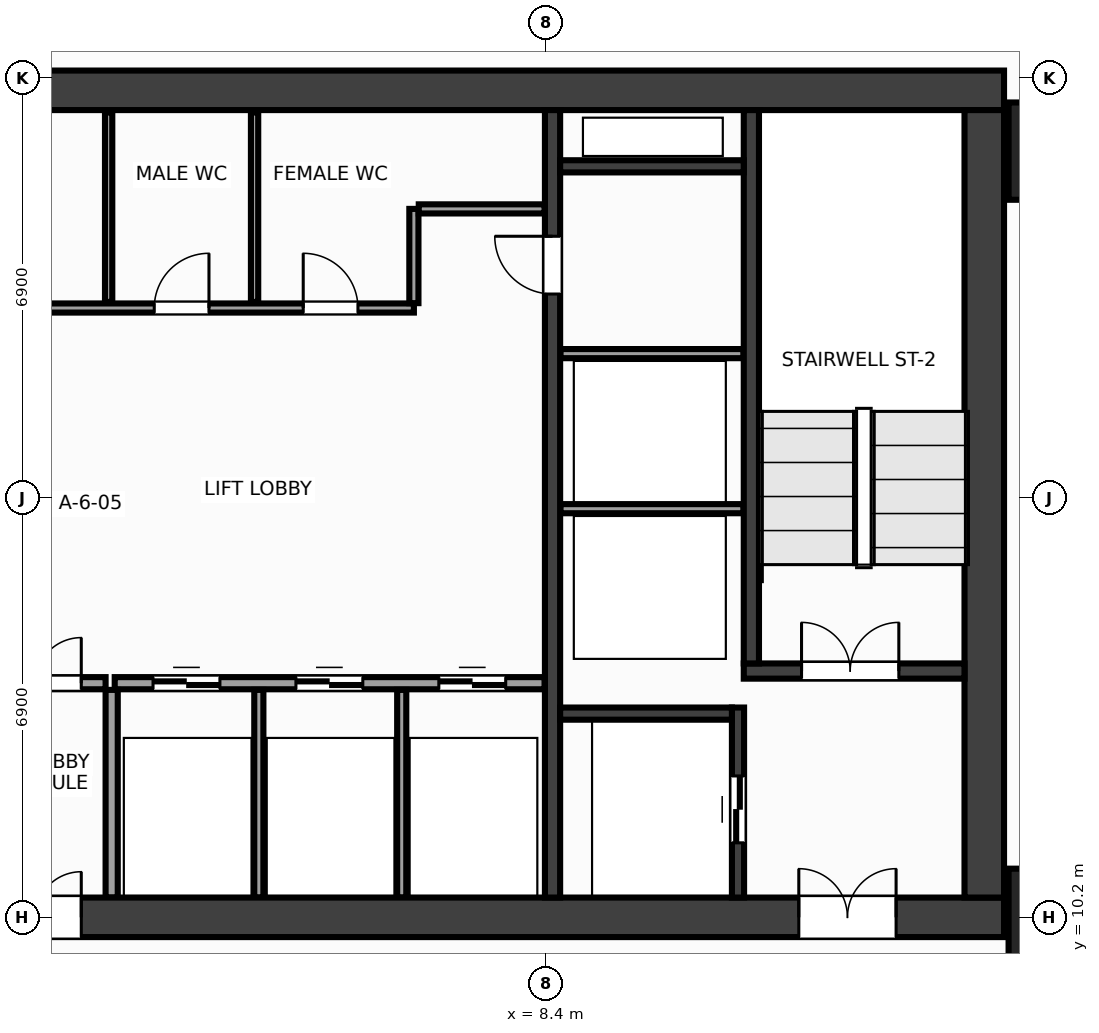
"""IFC4 building model, lengths in metres.
Left out: names, types, materials, properties, quantities, classifications, styles, units other than length and angle.
Written with IfcOpenShell. Run it as: python <this file> out.ifc"""

import sys

from ifc_helpers import new_model, si_unit, direction, frame, frame_2d, origin, origin_2d, place, context, subcontext, project, spatial, rectangle, extrude, source, transform, mapped, element, fill, save


model = new_model("IFC4")
c1 = context("Model", 3, precision=1e-05, world=origin(), true_north=direction((0.0, 1.0)))
c2 = subcontext(c1, "Body", "Model", "MODEL_VIEW")
j1 = project(units=[si_unit("LENGTHUNIT", "METRE"), si_unit("PLANEANGLEUNIT", "RADIAN")], contexts=[c1])
p1 = place(None, origin())
s1 = spatial("IfcSite", under=j1, at=p1, CompositionType="ELEMENT")
p2 = place(p1, origin())
s2 = spatial("IfcBuilding", under=s1, at=p2, CompositionType="ELEMENT")
p3 = place(p2, frame((0.0, 0.0, 167.6)))
s3 = spatial("IfcBuildingStorey", under=s2, at=p3, CompositionType="ELEMENT", Elevation=167.6)
m1 = source(origin(), c2, "Body", "SweptSolid", [
    extrude(rectangle(XDim=31.85, YDim=0.65, at=frame_2d((15.925, 0.0))), origin(), (0.0, 0.0, 1.0), 3.6),
])
p4 = place(p3, frame((-15.925, 23.8, 0.0), z_axis=(0.0, 0.0, 1.0), x_axis=(1.0, 0.0, 0.0)))
e1 = element("IfcWall", 1, at=p4, inside=s3, PredefinedType="SHEAR", context=c2, shape_type="MappedRepresentation", body=[
    mapped(m1, transform((0.0, 0.0, 0.0), x_axis=(1.0, 0.0, 0.0), y_axis=(0.0, 1.0, 0.0), z_axis=(0.0, 0.0, 1.0), scale=1.0)),
])
p5 = place(p3, frame((-15.925, 10.2, 0.0), z_axis=(0.0, 0.0, 1.0), x_axis=(1.0, 0.0, 0.0)))
e2 = element("IfcWall", 2, at=p5, inside=s3, PredefinedType="SHEAR", context=c2, shape_type="MappedRepresentation", body=[
    mapped(m1, transform((0.0, 0.0, 0.0), x_axis=(1.0, 0.0, 0.0), y_axis=(0.0, 1.0, 0.0), z_axis=(0.0, 0.0, 1.0), scale=1.0)),
])
p6 = place(p5, frame((1.775, 0.0, 0.0)))
e3 = element("IfcOpeningElement", 3, at=p6, cuts=e2, PredefinedType="OPENING", context=c2, shape_type="SweptSolid", body=[
    extrude(rectangle(XDim=1.6, YDim=2.15, at=frame_2d((0.8, 1.075))), frame((0.0, 0.337, 0.0), z_axis=(0.0, -1.0, 0.0), x_axis=(1.0, 0.0, 0.0)), (0.0, 0.0, 1.0), 0.674),
])
p7 = place(p5, frame((28.475, 0.0, 0.0)))
e4 = element("IfcOpeningElement", 4, at=p7, cuts=e2, PredefinedType="OPENING", context=c2, shape_type="SweptSolid", body=[
    extrude(rectangle(XDim=1.6, YDim=2.15, at=frame_2d((0.8, 1.075))), frame((0.0, 0.337, 0.0), z_axis=(0.0, -1.0, 0.0), x_axis=(1.0, 0.0, 0.0)), (0.0, 0.0, 1.0), 0.674),
])
p8 = place(p5, frame((15.175, 0.0, 0.0)))
e5 = element("IfcOpeningElement", 5, at=p8, cuts=e2, PredefinedType="OPENING", context=c2, shape_type="SweptSolid", body=[
    extrude(rectangle(XDim=1.5, YDim=2.2, at=frame_2d((0.75, 1.1))), frame((0.0, 0.337, 0.0), z_axis=(0.0, -1.0, 0.0), x_axis=(1.0, 0.0, 0.0)), (0.0, 0.0, 1.0), 0.674),
])
m2 = source(origin(), c2, "Body", "SweptSolid", [
    extrude(rectangle(XDim=12.95, YDim=0.65, at=frame_2d((6.475, 0.0))), origin(), (0.0, 0.0, 1.0), 3.6),
])
p9 = place(p3, frame((15.6, 10.525, 0.0), z_axis=(0.0, 0.0, 1.0), x_axis=(0.0, 1.0, 0.0)))
e6 = element("IfcWall", 6, at=p9, inside=s3, PredefinedType="SHEAR", context=c2, shape_type="MappedRepresentation", body=[
    mapped(m2, transform((0.0, 0.0, 0.0), x_axis=(1.0, 0.0, 0.0), y_axis=(0.0, 1.0, 0.0), z_axis=(0.0, 0.0, 1.0), scale=1.0)),
])
m3 = source(origin(), c2, "Body", "SweptSolid", [
    extrude(rectangle(XDim=12.95, YDim=0.25, at=frame_2d((6.475, 0.0))), origin(), (0.0, 0.0, 1.0), 3.6),
])
p10 = place(p3, frame((8.5, 10.525, 0.0), z_axis=(0.0, 0.0, 1.0), x_axis=(0.0, 1.0, 0.0)))
e7 = element("IfcWall", 7, at=p10, inside=s3, PredefinedType="SHEAR", context=c2, shape_type="MappedRepresentation", body=[
    mapped(m3, transform((0.0, 0.0, 0.0), x_axis=(1.0, 0.0, 0.0), y_axis=(0.0, 1.0, 0.0), z_axis=(0.0, 0.0, 1.0), scale=1.0)),
])
p11 = place(p10, frame((9.925, 0.0, 0.0)))
e8 = element("IfcOpeningElement", 8, at=p11, cuts=e7, PredefinedType="OPENING", context=c2, shape_type="SweptSolid", body=[
    extrude(rectangle(XDim=0.95, YDim=2.15, at=frame_2d((0.475, 1.075))), frame((0.0, 0.137, 0.0), z_axis=(0.0, -1.0, 0.0), x_axis=(1.0, 0.0, 0.0)), (0.0, 0.0, 1.0), 0.274),
])
m4 = source(origin(), c2, "Body", "SweptSolid", [
    extrude(rectangle(XDim=3.63, YDim=0.25, at=frame_2d((1.815, 0.0))), origin(), (0.0, 0.0, 1.0), 3.6),
])
p12 = place(p3, frame((11.645, 14.25, 0.0), z_axis=(0.0, 0.0, 1.0), x_axis=(1.0, 0.0, 0.0)))
e9 = element("IfcWall", 9, at=p12, inside=s3, PredefinedType="SHEAR", context=c2, shape_type="MappedRepresentation", body=[
    mapped(m4, transform((0.0, 0.0, 0.0), x_axis=(1.0, 0.0, 0.0), y_axis=(0.0, 1.0, 0.0), z_axis=(0.0, 0.0, 1.0), scale=1.0)),
])
p13 = place(p12, frame((0.95, 0.0, 0.0)))
e10 = element("IfcOpeningElement", 10, at=p13, cuts=e9, PredefinedType="OPENING", context=c2, shape_type="SweptSolid", body=[
    extrude(rectangle(XDim=1.6, YDim=2.15, at=frame_2d((0.8, 1.075))), frame((0.0, 0.137, 0.0), z_axis=(0.0, -1.0, 0.0), x_axis=(1.0, 0.0, 0.0)), (0.0, 0.0, 1.0), 0.274),
])
m5 = source(origin(), c2, "Body", "SweptSolid", [
    extrude(rectangle(XDim=9.1, YDim=0.25, at=frame_2d((4.55, 0.0))), origin(), (0.0, 0.0, 1.0), 3.6),
])
p14 = place(p3, frame((11.77, 14.375, 0.0), z_axis=(0.0, 0.0, 1.0), x_axis=(0.0, 1.0, 0.0)))
e11 = element("IfcWall", 11, at=p14, inside=s3, PredefinedType="SHEAR", context=c2, shape_type="MappedRepresentation", body=[
    mapped(m5, transform((0.0, 0.0, 0.0), x_axis=(1.0, 0.0, 0.0), y_axis=(0.0, 1.0, 0.0), z_axis=(0.0, 0.0, 1.0), scale=1.0)),
])
m6 = source(origin(), c2, "Body", "SweptSolid", [
    extrude(rectangle(XDim=3.125, YDim=0.2, at=frame_2d((1.562, 0.0))), origin(), (0.0, 0.0, 1.0), 3.6),
])
p15 = place(p3, frame((11.55, 10.525, 0.0), z_axis=(0.0, 0.0, 1.0), x_axis=(0.0, 1.0, 0.0)))
e12 = element("IfcWall", 12, at=p15, inside=s3, PredefinedType="SHEAR", context=c2, shape_type="MappedRepresentation", body=[
    mapped(m6, transform((0.0, 0.0, 0.0), x_axis=(1.0, 0.0, 0.0), y_axis=(0.0, 1.0, 0.0), z_axis=(0.0, 0.0, 1.0), scale=1.0)),
])
p16 = place(p15, frame((0.9, 0.0, 0.0)))
e13 = element("IfcOpeningElement", 13, at=p16, cuts=e12, PredefinedType="OPENING", context=c2, shape_type="SweptSolid", body=[
    extrude(rectangle(XDim=1.1, YDim=2.15, at=frame_2d((0.55, 1.075))), frame((0.0, 0.112, 0.0), z_axis=(0.0, -1.0, 0.0), x_axis=(1.0, 0.0, 0.0)), (0.0, 0.0, 1.0), 0.224),
])
m7 = source(origin(), c2, "Body", "SweptSolid", [
    extrude(rectangle(XDim=2.825, YDim=0.2, at=frame_2d((1.413, 0.0))), origin(), (0.0, 0.0, 1.0), 3.6),
])
p17 = place(p3, frame((8.625, 13.55, 0.0), z_axis=(0.0, 0.0, 1.0), x_axis=(1.0, 0.0, 0.0)))
e14 = element("IfcWall", 14, at=p17, inside=s3, PredefinedType="SHEAR", context=c2, shape_type="MappedRepresentation", body=[
    mapped(m7, transform((0.0, 0.0, 0.0), x_axis=(1.0, 0.0, 0.0), y_axis=(0.0, 1.0, 0.0), z_axis=(0.0, 0.0, 1.0), scale=1.0)),
])
m8 = source(origin(), c2, "Body", "SweptSolid", [
    extrude(rectangle(XDim=3.02, YDim=0.2, at=frame_2d((1.51, 0.0))), origin(), (0.0, 0.0, 1.0), 3.6),
])
p18 = place(p3, frame((8.625, 22.55, 0.0), z_axis=(0.0, 0.0, 1.0), x_axis=(1.0, 0.0, 0.0)))
e15 = element("IfcWall", 15, at=p18, inside=s3, PredefinedType="SHEAR", context=c2, shape_type="MappedRepresentation", body=[
    mapped(m8, transform((0.0, 0.0, 0.0), x_axis=(1.0, 0.0, 0.0), y_axis=(0.0, 1.0, 0.0), z_axis=(0.0, 0.0, 1.0), scale=1.0)),
])
m9 = source(origin(), c2, "Body", "SweptSolid", [
    extrude(rectangle(XDim=1.6, YDim=1.6, at=origin_2d()), origin(), (0.0, 0.0, 1.0), 3.6),
])
for number, where, z_axis, x_axis in (
    (16, (16.8, 10.2, 0.0), (0.0, 0.0, 1.0), (1.0, 0.0, 0.0)),
    (17, (16.8, 22.8, 0.0), (0.0, 0.0, 1.0), (1.0, 0.0, 0.0)),
):
    element("IfcColumn", number, at=place(p3, frame(where, z_axis=z_axis, x_axis=x_axis)), inside=s3, PredefinedType="COLUMN", context=c2, shape_type="MappedRepresentation", body=[
        mapped(m9, transform((0.0, 0.0, 0.0), x_axis=(1.0, 0.0, 0.0), y_axis=(0.0, 1.0, 0.0), z_axis=(0.0, 0.0, 1.0), scale=1.0)),
    ])
m10 = source(origin(), c2, "Body", "SweptSolid", [
    extrude(rectangle(XDim=3.01, YDim=0.15, at=frame_2d((1.505, 0.0))), origin(), (0.0, 0.0, 1.0), 3.38),
])
for number, where, z_axis, x_axis in (
    (18, (8.63, 16.92, 0.0), (0.0, 0.0, 1.0), (1.0, 0.0, 0.0)),
    (19, (8.63, 19.47, 0.0), (0.0, 0.0, 1.0), (1.0, 0.0, 0.0)),
):
    element("IfcWall", number, at=place(p3, frame(where, z_axis=z_axis, x_axis=x_axis)), inside=s3, PredefinedType="PARTITIONING", context=c2, shape_type="MappedRepresentation", body=[
        mapped(m10, transform((0.0, 0.0, 0.0), x_axis=(1.0, 0.0, 0.0), y_axis=(0.0, 1.0, 0.0), z_axis=(0.0, 0.0, 1.0), scale=1.0)),
    ])
m11 = source(origin(), c2, "Body", "SweptSolid", [
    extrude(rectangle(XDim=7.07, YDim=0.2, at=frame_2d((3.535, 0.0))), origin(), (0.0, 0.0, 1.0), 3.38),
])
p19 = place(p3, frame((1.3, 14.05, 0.0), z_axis=(0.0, 0.0, 1.0), x_axis=(1.0, 0.0, 0.0)))
e20 = element("IfcWall", 20, at=p19, inside=s3, PredefinedType="PARTITIONING", context=c2, shape_type="MappedRepresentation", body=[
    mapped(m11, transform((0.0, 0.0, 0.0), x_axis=(1.0, 0.0, 0.0), y_axis=(0.0, 1.0, 0.0), z_axis=(0.0, 0.0, 1.0), scale=1.0)),
])
p20 = place(p19, frame((0.63, 0.0, 0.0)))
e21 = element("IfcOpeningElement", 21, at=p20, cuts=e20, PredefinedType="OPENING", context=c2, shape_type="SweptSolid", body=[
    extrude(rectangle(XDim=1.1, YDim=2.15, at=frame_2d((0.55, 1.075))), frame((0.0, 0.112, 0.0), z_axis=(0.0, -1.0, 0.0), x_axis=(1.0, 0.0, 0.0)), (0.0, 0.0, 1.0), 0.224),
])
p21 = place(p19, frame((2.98, 0.0, 0.0)))
e22 = element("IfcOpeningElement", 22, at=p21, cuts=e20, PredefinedType="OPENING", context=c2, shape_type="SweptSolid", body=[
    extrude(rectangle(XDim=1.1, YDim=2.15, at=frame_2d((0.55, 1.075))), frame((0.0, 0.112, 0.0), z_axis=(0.0, -1.0, 0.0), x_axis=(1.0, 0.0, 0.0)), (0.0, 0.0, 1.0), 0.224),
])
p22 = place(p19, frame((5.33, 0.0, 0.0)))
e23 = element("IfcOpeningElement", 23, at=p22, cuts=e20, PredefinedType="OPENING", context=c2, shape_type="SweptSolid", body=[
    extrude(rectangle(XDim=1.1, YDim=2.15, at=frame_2d((0.55, 1.075))), frame((0.0, 0.112, 0.0), z_axis=(0.0, -1.0, 0.0), x_axis=(1.0, 0.0, 0.0)), (0.0, 0.0, 1.0), 0.224),
])
m12 = source(origin(), c2, "Body", "SweptSolid", [
    extrude(rectangle(XDim=3.415, YDim=0.2, at=frame_2d((1.708, 0.0))), origin(), (0.0, 0.0, 1.0), 3.38),
])
p23 = place(p3, frame((1.25, 10.525, 0.0), z_axis=(0.0, 0.0, 1.0), x_axis=(0.0, 1.0, 0.0)))
e24 = element("IfcWall", 24, at=p23, inside=s3, PredefinedType="PARTITIONING", context=c2, shape_type="MappedRepresentation", body=[
    mapped(m12, transform((0.0, 0.0, 0.0), x_axis=(1.0, 0.0, 0.0), y_axis=(0.0, 1.0, 0.0), z_axis=(0.0, 0.0, 1.0), scale=1.0)),
])
m13 = source(origin(), c2, "Body", "SweptSolid", [
    extrude(rectangle(XDim=2.3, YDim=0.2, at=frame_2d((1.15, 0.0))), origin(), (0.0, 0.0, 1.0), 3.38),
])
p24 = place(p3, frame((-1.15, 14.05, 0.0), z_axis=(0.0, 0.0, 1.0), x_axis=(1.0, 0.0, 0.0)))
e25 = element("IfcWall", 25, at=p24, inside=s3, PredefinedType="PARTITIONING", context=c2, shape_type="MappedRepresentation", body=[
    mapped(m13, transform((0.0, 0.0, 0.0), x_axis=(1.0, 0.0, 0.0), y_axis=(0.0, 1.0, 0.0), z_axis=(0.0, 0.0, 1.0), scale=1.0)),
])
p25 = place(p24, frame((0.4, 0.0, 0.0)))
e26 = element("IfcOpeningElement", 26, at=p25, cuts=e25, PredefinedType="OPENING", context=c2, shape_type="SweptSolid", body=[
    extrude(rectangle(XDim=1.5, YDim=2.2, at=frame_2d((0.75, 1.1))), frame((0.0, 0.112, 0.0), z_axis=(0.0, -1.0, 0.0), x_axis=(1.0, 0.0, 0.0)), (0.0, 0.0, 1.0), 0.224),
])
m14 = source(origin(), c2, "Body", "SweptSolid", [
    extrude(rectangle(XDim=14.59, YDim=0.15, at=frame_2d((7.295, 0.0))), origin(), (0.0, 0.0, 1.0), 3.38),
])
p26 = place(p3, frame((-8.37, 20.22, 0.0), z_axis=(0.0, 0.0, 1.0), x_axis=(1.0, 0.0, 0.0)))
e27 = element("IfcWall", 27, at=p26, inside=s3, PredefinedType="PARTITIONING", context=c2, shape_type="MappedRepresentation", body=[
    mapped(m14, transform((0.0, 0.0, 0.0), x_axis=(1.0, 0.0, 0.0), y_axis=(0.0, 1.0, 0.0), z_axis=(0.0, 0.0, 1.0), scale=1.0)),
])
p27 = place(p26, frame((4.36, 0.0, 0.0)))
e28 = element("IfcOpeningElement", 28, at=p27, cuts=e27, PredefinedType="OPENING", context=c2, shape_type="SweptSolid", body=[
    extrude(rectangle(XDim=0.9, YDim=2.15, at=frame_2d((0.45, 1.075))), frame((0.0, 0.087, 0.0), z_axis=(0.0, -1.0, 0.0), x_axis=(1.0, 0.0, 0.0)), (0.0, 0.0, 1.0), 0.174),
])
p28 = place(p26, frame((10.32, 0.0, 0.0)))
e29 = element("IfcOpeningElement", 29, at=p28, cuts=e27, PredefinedType="OPENING", context=c2, shape_type="SweptSolid", body=[
    extrude(rectangle(XDim=0.9, YDim=2.15, at=frame_2d((0.45, 1.075))), frame((0.0, 0.087, 0.0), z_axis=(0.0, -1.0, 0.0), x_axis=(1.0, 0.0, 0.0)), (0.0, 0.0, 1.0), 0.174),
])
p29 = place(p26, frame((12.77, 0.0, 0.0)))
e30 = element("IfcOpeningElement", 30, at=p29, cuts=e27, PredefinedType="OPENING", context=c2, shape_type="SweptSolid", body=[
    extrude(rectangle(XDim=0.9, YDim=2.15, at=frame_2d((0.45, 1.075))), frame((0.0, 0.087, 0.0), z_axis=(0.0, -1.0, 0.0), x_axis=(1.0, 0.0, 0.0)), (0.0, 0.0, 1.0), 0.174),
])
m15 = source(origin(), c2, "Body", "SweptSolid", [
    extrude(rectangle(XDim=1.55, YDim=0.15, at=frame_2d((0.775, 0.0))), origin(), (0.0, 0.0, 1.0), 3.38),
])
p30 = place(p3, frame((6.22, 20.3, 0.0), z_axis=(0.0, 0.0, 1.0), x_axis=(0.0, 1.0, 0.0)))
e31 = element("IfcWall", 31, at=p30, inside=s3, PredefinedType="PARTITIONING", context=c2, shape_type="MappedRepresentation", body=[
    mapped(m15, transform((0.0, 0.0, 0.0), x_axis=(1.0, 0.0, 0.0), y_axis=(0.0, 1.0, 0.0), z_axis=(0.0, 0.0, 1.0), scale=1.0)),
])
m16 = source(origin(), c2, "Body", "SweptSolid", [
    extrude(rectangle(XDim=2.07, YDim=0.15, at=frame_2d((1.035, 0.0))), origin(), (0.0, 0.0, 1.0), 3.38),
])
p31 = place(p3, frame((6.3, 21.85, 0.0), z_axis=(0.0, 0.0, 1.0), x_axis=(1.0, 0.0, 0.0)))
e32 = element("IfcWall", 32, at=p31, inside=s3, PredefinedType="PARTITIONING", context=c2, shape_type="MappedRepresentation", body=[
    mapped(m16, transform((0.0, 0.0, 0.0), x_axis=(1.0, 0.0, 0.0), y_axis=(0.0, 1.0, 0.0), z_axis=(0.0, 0.0, 1.0), scale=1.0)),
])
m17 = source(origin(), c2, "Body", "SweptSolid", [
    extrude(rectangle(XDim=3.415, YDim=0.15, at=frame_2d((1.708, 0.0))), origin(), (0.0, 0.0, 1.0), 3.38),
])
for number, where, z_axis, x_axis in (
    (33, (3.67, 10.525, 0.0), (0.0, 0.0, 1.0), (0.0, 1.0, 0.0)),
    (34, (6.02, 10.525, 0.0), (0.0, 0.0, 1.0), (0.0, 1.0, 0.0)),
):
    element("IfcWall", number, at=place(p3, frame(where, z_axis=z_axis, x_axis=x_axis)), inside=s3, PredefinedType="PARTITIONING", context=c2, shape_type="MappedRepresentation", body=[
        mapped(m17, transform((0.0, 0.0, 0.0), x_axis=(1.0, 0.0, 0.0), y_axis=(0.0, 1.0, 0.0), z_axis=(0.0, 0.0, 1.0), scale=1.0)),
    ])
m18 = source(origin(), c2, "Body", "SweptSolid", [
    extrude(rectangle(XDim=3.115, YDim=0.12, at=frame_2d((1.558, 0.0))), origin(), (0.0, 0.0, 1.0), 3.38),
])
for number, where, z_axis, x_axis in (
    (35, (1.2, 20.32, 0.0), (0.0, 0.0, 1.0), (0.0, 1.0, 0.0)),
    (36, (3.6, 20.32, 0.0), (0.0, 0.0, 1.0), (0.0, 1.0, 0.0)),
):
    element("IfcWall", number, at=place(p3, frame(where, z_axis=z_axis, x_axis=x_axis)), inside=s3, PredefinedType="PARTITIONING", context=c2, shape_type="MappedRepresentation", body=[
        mapped(m18, transform((0.0, 0.0, 0.0), x_axis=(1.0, 0.0, 0.0), y_axis=(0.0, 1.0, 0.0), z_axis=(0.0, 0.0, 1.0), scale=1.0)),
    ])
m19 = source(origin(), c2, "Body", "SweptSolid", [
    extrude(rectangle(XDim=1.6, YDim=2.15, at=frame_2d((0.8, 1.075))), frame((0.0, 0.025, 0.0), z_axis=(0.0, -1.0, 0.0), x_axis=(1.0, 0.0, 0.0)), (0.0, 0.0, 1.0), 0.05),
])
p32 = place(p13, origin())
e37 = element("IfcDoor", 37, at=p32, inside=s3, OperationType="DOUBLE_DOOR_SINGLE_SWING", PredefinedType="DOOR", context=c2, shape_type="MappedRepresentation", body=[
    mapped(m19, transform((0.0, 0.0, 0.0), x_axis=(1.0, 0.0, 0.0), y_axis=(0.0, 1.0, 0.0), z_axis=(0.0, 0.0, 1.0), scale=1.0)),
])
fill(e10, e37)
p33 = place(p7, origin())
e38 = element("IfcDoor", 38, at=p33, inside=s3, OperationType="DOUBLE_DOOR_SINGLE_SWING", PredefinedType="DOOR", context=c2, shape_type="MappedRepresentation", body=[
    mapped(m19, transform((0.0, 0.0, 0.0), x_axis=(1.0, 0.0, 0.0), y_axis=(0.0, 1.0, 0.0), z_axis=(0.0, 0.0, 1.0), scale=1.0)),
])
fill(e4, e38)
m20 = source(origin(), c2, "Body", "SweptSolid", [
    extrude(rectangle(XDim=1.1, YDim=2.15, at=frame_2d((0.55, 1.075))), frame((0.0, 0.025, 0.0), z_axis=(0.0, -1.0, 0.0), x_axis=(1.0, 0.0, 0.0)), (0.0, 0.0, 1.0), 0.05),
])
p34 = place(p16, origin())
e39 = element("IfcDoor", 39, at=p34, inside=s3, OperationType="DOUBLE_DOOR_SLIDING", PredefinedType="DOOR", context=c2, shape_type="MappedRepresentation", body=[
    mapped(m20, transform((0.0, 0.0, 0.0), x_axis=(1.0, 0.0, 0.0), y_axis=(0.0, 1.0, 0.0), z_axis=(0.0, 0.0, 1.0), scale=1.0)),
])
fill(e13, e39)
m21 = source(origin(), c2, "Body", "SweptSolid", [
    extrude(rectangle(XDim=0.95, YDim=2.15, at=frame_2d((0.475, 1.075))), frame((0.0, 0.025, 0.0), z_axis=(0.0, -1.0, 0.0), x_axis=(1.0, 0.0, 0.0)), (0.0, 0.0, 1.0), 0.05),
])
p35 = place(p11, origin())
e40 = element("IfcDoor", 40, at=p35, inside=s3, OperationType="SINGLE_SWING_RIGHT", PredefinedType="DOOR", context=c2, shape_type="MappedRepresentation", body=[
    mapped(m21, transform((0.0, 0.0, 0.0), x_axis=(1.0, 0.0, 0.0), y_axis=(0.0, 1.0, 0.0), z_axis=(0.0, 0.0, 1.0), scale=1.0)),
])
fill(e8, e40)
p36 = place(p20, origin())
e41 = element("IfcDoor", 41, at=p36, inside=s3, OperationType="DOUBLE_DOOR_SLIDING", PredefinedType="DOOR", context=c2, shape_type="MappedRepresentation", body=[
    mapped(m20, transform((0.0, 0.0, 0.0), x_axis=(1.0, 0.0, 0.0), y_axis=(0.0, 1.0, 0.0), z_axis=(0.0, 0.0, 1.0), scale=1.0)),
])
fill(e21, e41)
p37 = place(p21, origin())
e42 = element("IfcDoor", 42, at=p37, inside=s3, OperationType="DOUBLE_DOOR_SLIDING", PredefinedType="DOOR", context=c2, shape_type="MappedRepresentation", body=[
    mapped(m20, transform((0.0, 0.0, 0.0), x_axis=(1.0, 0.0, 0.0), y_axis=(0.0, 1.0, 0.0), z_axis=(0.0, 0.0, 1.0), scale=1.0)),
])
fill(e22, e42)
p38 = place(p22, origin())
e43 = element("IfcDoor", 43, at=p38, inside=s3, OperationType="DOUBLE_DOOR_SLIDING", PredefinedType="DOOR", context=c2, shape_type="MappedRepresentation", body=[
    mapped(m20, transform((0.0, 0.0, 0.0), x_axis=(1.0, 0.0, 0.0), y_axis=(0.0, 1.0, 0.0), z_axis=(0.0, 0.0, 1.0), scale=1.0)),
])
fill(e23, e43)
m22 = source(origin(), c2, "Body", "SweptSolid", [
    extrude(rectangle(XDim=1.5, YDim=2.2, at=frame_2d((0.75, 1.1))), frame((0.0, 0.025, 0.0), z_axis=(0.0, -1.0, 0.0), x_axis=(1.0, 0.0, 0.0)), (0.0, 0.0, 1.0), 0.05),
])
p39 = place(p25, origin())
e44 = element("IfcDoor", 44, at=p39, inside=s3, OperationType="DOUBLE_DOOR_SINGLE_SWING", PredefinedType="DOOR", context=c2, shape_type="MappedRepresentation", body=[
    mapped(m22, transform((0.0, 0.0, 0.0), x_axis=(1.0, 0.0, 0.0), y_axis=(0.0, 1.0, 0.0), z_axis=(0.0, 0.0, 1.0), scale=1.0)),
])
fill(e26, e44)
p40 = place(p8, origin())
e45 = element("IfcDoor", 45, at=p40, inside=s3, OperationType="DOUBLE_DOOR_SINGLE_SWING", PredefinedType="DOOR", context=c2, shape_type="MappedRepresentation", body=[
    mapped(m22, transform((0.0, 0.0, 0.0), x_axis=(1.0, 0.0, 0.0), y_axis=(0.0, 1.0, 0.0), z_axis=(0.0, 0.0, 1.0), scale=1.0)),
])
fill(e5, e45)
m23 = source(origin(), c2, "Body", "SweptSolid", [
    extrude(rectangle(XDim=0.9, YDim=2.15, at=frame_2d((0.45, 1.075))), frame((0.0, 0.025, 0.0), z_axis=(0.0, -1.0, 0.0), x_axis=(1.0, 0.0, 0.0)), (0.0, 0.0, 1.0), 0.05),
])
p41 = place(p28, origin())
e46 = element("IfcDoor", 46, at=p41, inside=s3, OperationType="SINGLE_SWING_RIGHT", PredefinedType="DOOR", context=c2, shape_type="MappedRepresentation", body=[
    mapped(m23, transform((0.0, 0.0, 0.0), x_axis=(1.0, 0.0, 0.0), y_axis=(0.0, 1.0, 0.0), z_axis=(0.0, 0.0, 1.0), scale=1.0)),
])
fill(e29, e46)
p42 = place(p29, origin())
e47 = element("IfcDoor", 47, at=p42, inside=s3, OperationType="SINGLE_SWING_LEFT", PredefinedType="DOOR", context=c2, shape_type="MappedRepresentation", body=[
    mapped(m23, transform((0.0, 0.0, 0.0), x_axis=(1.0, 0.0, 0.0), y_axis=(0.0, 1.0, 0.0), z_axis=(0.0, 0.0, 1.0), scale=1.0)),
])
fill(e30, e47)
save(model, sys.argv[1])
